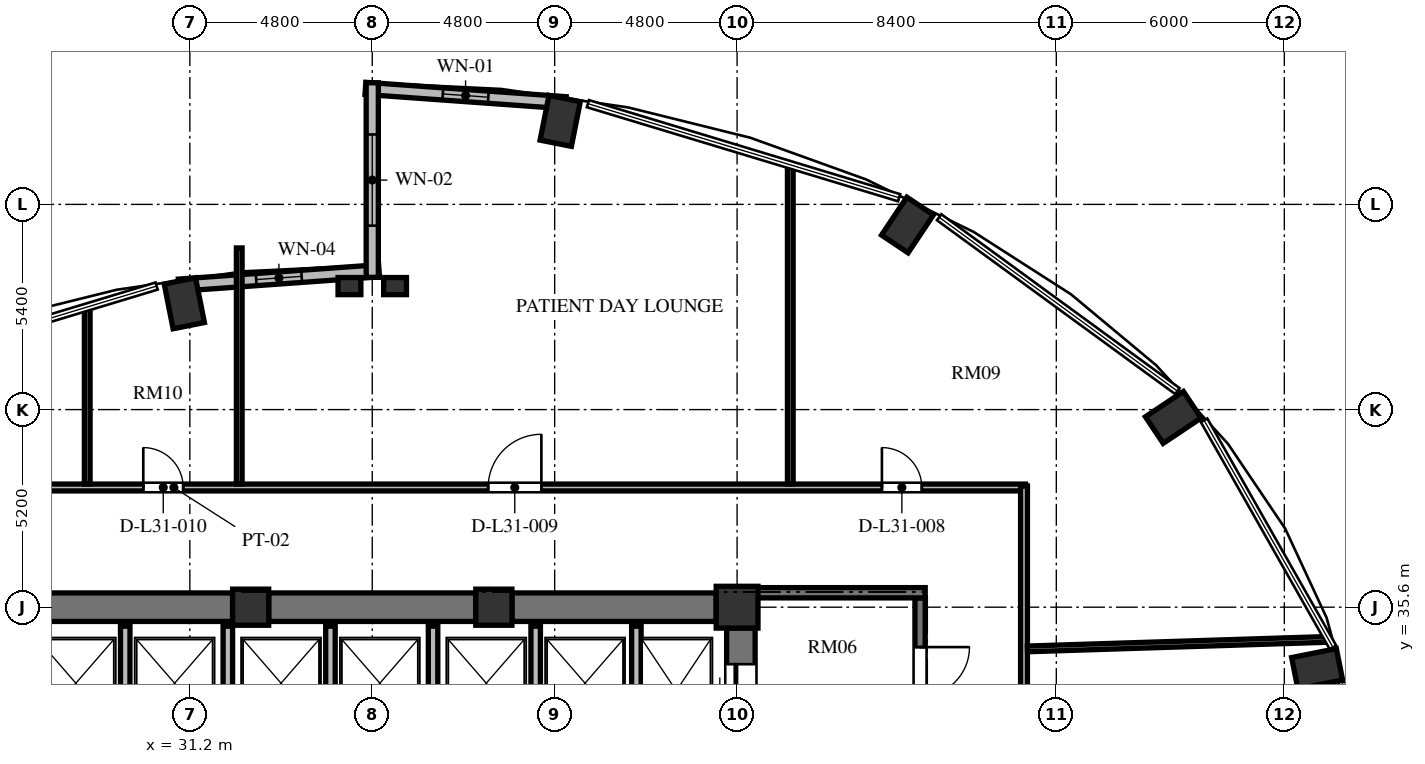
"""IFC4 building model, lengths in metres.
Left out: names, types, materials, properties, quantities, classifications, styles, units other than length and angle.
Written with IfcOpenShell. Run it as: python <this file> out.ifc"""

import sys

from ifc_helpers import new_model, si_unit, direction, frame, frame_2d, origin, origin_2d, place, context, subcontext, project, spatial, rectangle, extrude, element, fill, save


model = new_model("IFC4")
c1 = context("Model", 3, precision=1e-05, world=origin(), true_north=direction((0.0, 1.0)))
c2 = subcontext(c1, "Body", "Model", "MODEL_VIEW")
j1 = project(units=[si_unit("LENGTHUNIT", "METRE"), si_unit("PLANEANGLEUNIT", "RADIAN")], contexts=[c1])
p1 = place(None, origin())
s1 = spatial("IfcSite", under=j1, at=p1, CompositionType="ELEMENT")
p2 = place(p1, origin())
s2 = spatial("IfcBuilding", under=s1, at=p2, CompositionType="ELEMENT")
p3 = place(p2, frame((0.0, 0.0, 121.872)))
s3 = spatial("IfcBuildingStorey", under=s2, at=p3, CompositionType="ELEMENT", Elevation=121.872)
for number, where, z_axis, x_axis in (
    (1, (60.863, 33.98, 0.0), (0.0, 0.0, 1.0), (0.981, 0.195, 0.0)),
    (2, (57.078, 40.595, 0.0), (0.0, 0.0, 1.0), (0.831, 0.556, 0.0)),
    (3, (50.084, 45.657, 0.0), (0.0, 0.0, 1.0), (0.556, 0.831, 0.0)),
    (4, (40.946, 48.397, 0.0), (0.0, 0.0, 1.0), (0.195, 0.981, 0.0)),
    (5, (31.054, 43.597, 0.0), (0.0, 0.0, 1.0), (-0.195, 0.981, 0.0)),
):
    element("IfcColumn", number, at=place(p3, frame(where, z_axis=z_axis, x_axis=x_axis)), inside=s3, PredefinedType="COLUMN", context=c2, shape_type="SweptSolid", body=[
        extrude(rectangle(XDim=1.2, YDim=0.84, at=origin_2d()), origin(), (0.0, 0.0, 1.0), 3.648),
    ])
p4 = place(p3, frame((45.6, 35.6, 0.0), z_axis=(0.0, 0.0, 1.0), x_axis=(1.0, 0.0, 0.0)))
e6 = element("IfcColumn", 6, at=p4, inside=s3, PredefinedType="COLUMN", context=c2, shape_type="SweptSolid", body=[
    extrude(rectangle(XDim=1.1, YDim=1.1, at=origin_2d()), origin(), (0.0, 0.0, 1.0), 3.648),
])
for number, where, z_axis, x_axis in (
    (7, (39.2, 35.6, 0.0), (0.0, 0.0, 1.0), (1.0, 0.0, 0.0)),
    (8, (32.8, 35.6, 0.0), (0.0, 0.0, 1.0), (1.0, 0.0, 0.0)),
):
    element("IfcColumn", number, at=place(p3, frame(where, z_axis=z_axis, x_axis=x_axis)), inside=s3, PredefinedType="COLUMN", context=c2, shape_type="SweptSolid", body=[
        extrude(rectangle(XDim=0.95, YDim=0.95, at=origin_2d()), origin(), (0.0, 0.0, 1.0), 3.648),
    ])
for number, where, z_axis, x_axis in (
    (9, (35.4, 44.05, 0.0), (0.0, 0.0, 1.0), (1.0, 0.0, 0.0)),
    (10, (36.6, 44.05, 0.0), (0.0, 0.0, 1.0), (1.0, 0.0, 0.0)),
):
    element("IfcColumn", number, at=place(p3, frame(where, z_axis=z_axis, x_axis=x_axis)), inside=s3, PredefinedType="PILASTER", context=c2, shape_type="SweptSolid", body=[
        extrude(rectangle(XDim=0.6, YDim=0.45, at=origin_2d()), origin(), (0.0, 0.0, 1.0), 3.648),
    ])
p5 = place(p3, frame((45.7, 20.95, 0.0), z_axis=(0.0, 0.0, 1.0), x_axis=(0.0, 1.0, 0.0)))
e11 = element("IfcWall", 11, at=p5, inside=s3, PredefinedType="SHEAR", context=c2, shape_type="SweptSolid", body=[
    extrude(rectangle(XDim=14.1, YDim=0.75, at=frame_2d((7.05, 0.0))), origin(), (0.0, 0.0, 1.0), 3.648),
])
p6 = place(p5, frame((11.75, 0.0, 0.0)))
e12 = element("IfcOpeningElement", 12, at=p6, cuts=e11, PredefinedType="OPENING", context=c2, shape_type="SweptSolid", body=[
    extrude(rectangle(XDim=1.4, YDim=2.3, at=frame_2d((0.7, 1.15))), frame((0.0, 0.385, 0.0), z_axis=(0.0, -1.0, 0.0), x_axis=(1.0, 0.0, 0.0)), (0.0, 0.0, 1.0), 0.77),
])
p7 = place(p5, frame((0.95, 0.0, 0.0)))
e13 = element("IfcOpeningElement", 13, at=p7, cuts=e11, PredefinedType="OPENING", context=c2, shape_type="SweptSolid", body=[
    extrude(rectangle(XDim=1.4, YDim=2.3, at=frame_2d((0.7, 1.15))), frame((0.0, 0.385, 0.0), z_axis=(0.0, -1.0, 0.0), x_axis=(1.0, 0.0, 0.0)), (0.0, 0.0, 1.0), 0.77),
])
p8 = place(p3, frame((26.95, 35.6, 0.0), z_axis=(0.0, 0.0, 1.0), x_axis=(1.0, 0.0, 0.0)))
e14 = element("IfcWall", 14, at=p8, inside=s3, PredefinedType="SHEAR", context=c2, shape_type="SweptSolid", body=[
    extrude(rectangle(XDim=5.375, YDim=0.75, at=frame_2d((2.688, 0.0))), origin(), (0.0, 0.0, 1.0), 3.648),
])
p9 = place(p3, frame((33.275, 35.6, 0.0), z_axis=(0.0, 0.0, 1.0), x_axis=(1.0, 0.0, 0.0)))
e15 = element("IfcWall", 15, at=p9, inside=s3, PredefinedType="SHEAR", context=c2, shape_type="SweptSolid", body=[
    extrude(rectangle(XDim=5.45, YDim=0.75, at=frame_2d((2.725, 0.0))), origin(), (0.0, 0.0, 1.0), 3.648),
])
p10 = place(p3, frame((39.675, 35.6, 0.0), z_axis=(0.0, 0.0, 1.0), x_axis=(1.0, 0.0, 0.0)))
e16 = element("IfcWall", 16, at=p10, inside=s3, PredefinedType="SHEAR", context=c2, shape_type="SweptSolid", body=[
    extrude(rectangle(XDim=5.375, YDim=0.75, at=frame_2d((2.688, 0.0))), origin(), (0.0, 0.0, 1.0), 3.648),
])
p11 = place(p3, frame((41.091, 48.875, 0.0), z_axis=(0.0, 0.0, 1.0), x_axis=(-0.997432364291, 0.071614793619, 0.0)))
e17 = element("IfcWall", 17, at=p11, inside=s3, PredefinedType="SOLIDWALL", context=c2, shape_type="SweptSolid", body=[
    extrude(rectangle(XDim=5.284, YDim=0.32, at=frame_2d((2.642, 0.0))), origin(), (0.0, 0.0, 1.0), 3.428),
])
p12 = place(p11, frame((2.042, 0.0, 0.85)))
e18 = element("IfcOpeningElement", 18, at=p12, cuts=e17, PredefinedType="OPENING", context=c2, shape_type="SweptSolid", body=[
    extrude(rectangle(XDim=1.2, YDim=2.2, at=frame_2d((0.6, 1.1))), frame((0.0, 0.17, 0.0), z_axis=(0.0, -1.0, 0.0), x_axis=(1.0, 0.0, 0.0)), (0.0, 0.0, 1.0), 0.34),
])
p13 = place(p3, frame((36.179, 44.453, 0.0), z_axis=(0.0, 0.0, 1.0), x_axis=(-0.997431890304, -0.071621394884, 0.0)))
e19 = element("IfcWall", 19, at=p13, inside=s3, PredefinedType="SOLIDWALL", context=c2, shape_type="SweptSolid", body=[
    extrude(rectangle(XDim=5.284, YDim=0.32, at=frame_2d((2.642, 0.0))), origin(), (0.0, 0.0, 1.0), 3.428),
])
p14 = place(p13, frame((2.042, 0.0, 0.85)))
e20 = element("IfcOpeningElement", 20, at=p14, cuts=e19, PredefinedType="OPENING", context=c2, shape_type="SweptSolid", body=[
    extrude(rectangle(XDim=1.2, YDim=1.8, at=frame_2d((0.6, 0.9))), frame((0.0, 0.17, 0.0), z_axis=(0.0, -1.0, 0.0), x_axis=(1.0, 0.0, 0.0)), (0.0, 0.0, 1.0), 0.34),
])
p15 = place(p3, frame((36.0, 49.4, 0.0), z_axis=(0.0, 0.0, 1.0), x_axis=(0.0, -1.0, 0.0)))
e21 = element("IfcWall", 21, at=p15, inside=s3, PredefinedType="SOLIDWALL", context=c2, shape_type="SweptSolid", body=[
    extrude(rectangle(XDim=5.12, YDim=0.32, at=frame_2d((2.56, 0.0))), origin(), (0.0, 0.0, 1.0), 3.428),
])
p16 = place(p15, frame((1.36, 0.0, 0.84)))
e22 = element("IfcOpeningElement", 22, at=p16, cuts=e21, PredefinedType="OPENING", context=c2, shape_type="SweptSolid", body=[
    extrude(rectangle(XDim=2.4, YDim=2.04, at=frame_2d((1.2, 1.02))), frame((0.0, 0.17, 0.0), z_axis=(0.0, -1.0, 0.0), x_axis=(1.0, 0.0, 0.0)), (0.0, 0.0, 1.0), 0.34),
])
p17 = place(p3, frame((42.95, 31.92, 0.0), z_axis=(0.0, 0.0, 1.0), x_axis=(0.0, 1.0, 0.0)))
e23 = element("IfcWall", 23, at=p17, inside=s3, PredefinedType="SOLIDWALL", context=c2, shape_type="SweptSolid", body=[
    extrude(rectangle(XDim=3.18, YDim=0.25, at=frame_2d((1.59, 0.0))), origin(), (0.0, 0.0, 1.0), 3.428),
])
for number, where, z_axis, x_axis in (
    (24, (29.5, 32.42, 0.0), (0.0, 0.0, 1.0), (0.0, 1.0, 0.0)),
    (25, (32.2, 32.42, 0.0), (0.0, 0.0, 1.0), (0.0, 1.0, 0.0)),
    (26, (34.9, 32.42, 0.0), (0.0, 0.0, 1.0), (0.0, 1.0, 0.0)),
    (27, (37.6, 32.42, 0.0), (0.0, 0.0, 1.0), (0.0, 1.0, 0.0)),
    (28, (40.3, 32.42, 0.0), (0.0, 0.0, 1.0), (0.0, 1.0, 0.0)),
):
    element("IfcWall", number, at=place(p3, frame(where, z_axis=z_axis, x_axis=x_axis)), inside=s3, PredefinedType="SOLIDWALL", context=c2, shape_type="SweptSolid", body=[
        extrude(rectangle(XDim=2.68, YDim=0.25, at=frame_2d((1.34, 0.0))), origin(), (0.0, 0.0, 1.0), 3.428),
    ])
p18 = place(p3, frame((50.415, 35.845, 0.0), z_axis=(0.0, 0.0, 1.0), x_axis=(0.0, -1.0, 0.0)))
e29 = element("IfcWall", 29, at=p18, inside=s3, PredefinedType="SHEAR", context=c2, shape_type="SweptSolid", body=[
    extrude(rectangle(XDim=15.825, YDim=0.27, at=frame_2d((7.913, 0.0))), origin(), (0.0, 0.0, 1.0), 3.648),
])
p19 = place(p18, frame((4.445, 0.0, 0.0)))
e30 = element("IfcOpeningElement", 30, at=p19, cuts=e29, PredefinedType="OPENING", context=c2, shape_type="SweptSolid", body=[
    extrude(rectangle(XDim=1.2, YDim=2.15, at=frame_2d((0.6, 1.075))), frame((0.0, 0.145, 0.0), z_axis=(0.0, -1.0, 0.0), x_axis=(1.0, 0.0, 0.0)), (0.0, 0.0, 1.0), 0.29),
])
p20 = place(p18, frame((1.295, 0.0, 0.0)))
e31 = element("IfcOpeningElement", 31, at=p20, cuts=e29, PredefinedType="OPENING", context=c2, shape_type="SweptSolid", body=[
    extrude(rectangle(XDim=1.3, YDim=2.2, at=frame_2d((0.65, 1.1))), frame((0.0, 0.145, 0.0), z_axis=(0.0, -1.0, 0.0), x_axis=(1.0, 0.0, 0.0)), (0.0, 0.0, 1.0), 0.29),
])
p21 = place(p18, frame((13.095, 0.0, 0.0)))
e32 = element("IfcOpeningElement", 32, at=p21, cuts=e29, PredefinedType="OPENING", context=c2, shape_type="SweptSolid", body=[
    extrude(rectangle(XDim=1.3, YDim=2.2, at=frame_2d((0.65, 1.1))), frame((0.0, 0.145, 0.0), z_axis=(0.0, -1.0, 0.0), x_axis=(1.0, 0.0, 0.0)), (0.0, 0.0, 1.0), 0.29),
])
p22 = place(p3, frame((46.075, 35.98, 0.0), z_axis=(0.0, 0.0, 1.0), x_axis=(1.0, 0.0, 0.0)))
e33 = element("IfcWall", 33, at=p22, inside=s3, PredefinedType="SHEAR", context=c2, shape_type="SweptSolid", body=[
    extrude(rectangle(XDim=4.475, YDim=0.27, at=frame_2d((2.238, 0.0))), origin(), (0.0, 0.0, 1.0), 3.648),
])
p23 = place(p3, frame((23.31, 38.75, 0.0), z_axis=(0.0, 0.0, 1.0), x_axis=(1.0, 0.0, 0.0)))
e34 = element("IfcWall", 34, at=p23, inside=s3, PredefinedType="PARTITIONING", context=c2, shape_type="SweptSolid", body=[
    extrude(rectangle(XDim=29.88, YDim=0.18, at=frame_2d((14.94, 0.0))), origin(), (0.0, 0.0, 1.0), 3.053),
])
p24 = place(p23, frame((26.101, 0.0, 0.0)))
e35 = element("IfcOpeningElement", 35, at=p24, cuts=e34, PredefinedType="OPENING", context=c2, shape_type="SweptSolid", body=[
    extrude(rectangle(XDim=1.05, YDim=2.15, at=frame_2d((0.525, 1.075))), frame((0.0, 0.1, 0.0), z_axis=(0.0, -1.0, 0.0), x_axis=(1.0, 0.0, 0.0)), (0.0, 0.0, 1.0), 0.2),
])
p25 = place(p23, frame((15.74, 0.0, 0.0)))
e36 = element("IfcOpeningElement", 36, at=p25, cuts=e34, PredefinedType="OPENING", context=c2, shape_type="SweptSolid", body=[
    extrude(rectangle(XDim=1.4, YDim=2.2, at=frame_2d((0.7, 1.1))), frame((0.0, 0.1, 0.0), z_axis=(0.0, -1.0, 0.0), x_axis=(1.0, 0.0, 0.0)), (0.0, 0.0, 1.0), 0.2),
])
p26 = place(p23, frame((6.665, 0.0, 0.0)))
e37 = element("IfcOpeningElement", 37, at=p26, cuts=e34, PredefinedType="OPENING", context=c2, shape_type="SweptSolid", body=[
    extrude(rectangle(XDim=1.05, YDim=2.15, at=frame_2d((0.525, 1.075))), frame((0.0, 0.1, 0.0), z_axis=(0.0, -1.0, 0.0), x_axis=(1.0, 0.0, 0.0)), (0.0, 0.0, 1.0), 0.2),
])
p27 = place(p3, frame((53.15, 38.79, 0.0), z_axis=(0.0, 0.0, 1.0), x_axis=(0.0, -1.0, 0.0)))
e38 = element("IfcWall", 38, at=p27, inside=s3, PredefinedType="PARTITIONING", context=c2, shape_type="SweptSolid", body=[
    extrude(rectangle(XDim=9.43, YDim=0.18, at=frame_2d((4.715, 0.0))), origin(), (0.0, 0.0, 1.0), 3.428),
])
p28 = place(p3, frame((53.24, 34.502, 0.0), z_axis=(0.0, 0.0, 1.0), x_axis=(0.999499445349, 0.031636351679, 0.0)))
e39 = element("IfcWall", 39, at=p28, inside=s3, PredefinedType="PARTITIONING", context=c2, shape_type="SweptSolid", body=[
    extrude(rectangle(XDim=7.933, YDim=0.15, at=frame_2d((3.967, 0.0))), origin(), (0.0, 0.0, 1.0), 2.813),
])
p29 = place(p3, frame((28.5, 38.84, 0.0), z_axis=(0.0, 0.0, 1.0), x_axis=(0.0, 1.0, 0.0)))
e40 = element("IfcWall", 40, at=p29, inside=s3, PredefinedType="PARTITIONING", context=c2, shape_type="SweptSolid", body=[
    extrude(rectangle(XDim=4.645, YDim=0.15, at=frame_2d((2.323, 0.0))), origin(), (0.0, 0.0, 1.0), 3.428),
])
p30 = place(p3, frame((32.5, 38.84, 0.0), z_axis=(0.0, 0.0, 1.0), x_axis=(0.0, 1.0, 0.0)))
e41 = element("IfcWall", 41, at=p30, inside=s3, PredefinedType="PARTITIONING", context=c2, shape_type="SweptSolid", body=[
    extrude(rectangle(XDim=6.214, YDim=0.15, at=frame_2d((3.107, 0.0))), origin(), (0.0, 0.0, 1.0), 3.428),
])
p31 = place(p3, frame((47.0, 38.84, 0.0), z_axis=(0.0, 0.0, 1.0), x_axis=(0.0, 1.0, 0.0)))
e42 = element("IfcWall", 42, at=p31, inside=s3, PredefinedType="PARTITIONING", context=c2, shape_type="SweptSolid", body=[
    extrude(rectangle(XDim=8.387, YDim=0.15, at=frame_2d((4.193, 0.0))), origin(), (0.0, 0.0, 1.0), 3.428),
])
p32 = place(p12, origin())
e43 = element("IfcWindow", 43, at=p32, inside=s3, PartitioningType="SINGLE_PANEL", PredefinedType="WINDOW", context=c2, shape_type="SweptSolid", body=[
    extrude(rectangle(XDim=1.2, YDim=2.2, at=frame_2d((0.6, 1.1))), frame((0.0, 0.03, 0.0), z_axis=(0.0, -1.0, 0.0), x_axis=(1.0, 0.0, 0.0)), (0.0, 0.0, 1.0), 0.06),
])
fill(e18, e43)
p33 = place(p14, origin())
e44 = element("IfcWindow", 44, at=p33, inside=s3, PartitioningType="SINGLE_PANEL", PredefinedType="WINDOW", context=c2, shape_type="SweptSolid", body=[
    extrude(rectangle(XDim=1.2, YDim=1.8, at=frame_2d((0.6, 0.9))), frame((0.0, 0.03, 0.0), z_axis=(0.0, -1.0, 0.0), x_axis=(1.0, 0.0, 0.0)), (0.0, 0.0, 1.0), 0.06),
])
fill(e20, e44)
p34 = place(p16, origin())
e45 = element("IfcWindow", 45, at=p34, inside=s3, PartitioningType="SINGLE_PANEL", PredefinedType="WINDOW", context=c2, shape_type="SweptSolid", body=[
    extrude(rectangle(XDim=2.4, YDim=2.04, at=frame_2d((1.2, 1.02))), frame((0.0, 0.03, 0.0), z_axis=(0.0, -1.0, 0.0), x_axis=(1.0, 0.0, 0.0)), (0.0, 0.0, 1.0), 0.06),
])
fill(e22, e45)
p35 = place(p6, origin())
e46 = element("IfcDoor", 46, at=p35, inside=s3, OperationType="SLIDING_TO_LEFT", PredefinedType="DOOR", context=c2, shape_type="SweptSolid", body=[
    extrude(rectangle(XDim=1.4, YDim=2.3, at=frame_2d((0.7, 1.15))), frame((0.0, 0.025, 0.0), z_axis=(0.0, -1.0, 0.0), x_axis=(1.0, 0.0, 0.0)), (0.0, 0.0, 1.0), 0.05),
])
fill(e12, e46)
p36 = place(p20, origin())
e47 = element("IfcDoor", 47, at=p36, inside=s3, OperationType="SINGLE_SWING_LEFT", PredefinedType="DOOR", context=c2, shape_type="SweptSolid", body=[
    extrude(rectangle(XDim=1.3, YDim=2.2, at=frame_2d((0.65, 1.1))), frame((0.0, 0.025, 0.0), z_axis=(0.0, -1.0, 0.0), x_axis=(1.0, 0.0, 0.0)), (0.0, 0.0, 1.0), 0.05),
])
fill(e31, e47)
p37 = place(p24, origin())
e48 = element("IfcDoor", 48, at=p37, inside=s3, OperationType="SINGLE_SWING_LEFT", PredefinedType="DOOR", context=c2, shape_type="SweptSolid", body=[
    extrude(rectangle(XDim=1.05, YDim=2.15, at=frame_2d((0.525, 1.075))), frame((0.0, 0.025, 0.0), z_axis=(0.0, -1.0, 0.0), x_axis=(1.0, 0.0, 0.0)), (0.0, 0.0, 1.0), 0.05),
])
fill(e35, e48)
p38 = place(p25, origin())
e49 = element("IfcDoor", 49, at=p38, inside=s3, OperationType="SINGLE_SWING_RIGHT", PredefinedType="DOOR", context=c2, shape_type="SweptSolid", body=[
    extrude(rectangle(XDim=1.4, YDim=2.2, at=frame_2d((0.7, 1.1))), frame((0.0, 0.025, 0.0), z_axis=(0.0, -1.0, 0.0), x_axis=(1.0, 0.0, 0.0)), (0.0, 0.0, 1.0), 0.05),
])
fill(e36, e49)
p39 = place(p26, origin())
e50 = element("IfcDoor", 50, at=p39, inside=s3, OperationType="SINGLE_SWING_LEFT", PredefinedType="DOOR", context=c2, shape_type="SweptSolid", body=[
    extrude(rectangle(XDim=1.05, YDim=2.15, at=frame_2d((0.525, 1.075))), frame((0.0, 0.025, 0.0), z_axis=(0.0, -1.0, 0.0), x_axis=(1.0, 0.0, 0.0)), (0.0, 0.0, 1.0), 0.05),
])
fill(e37, e50)
save(model, sys.argv[1])
